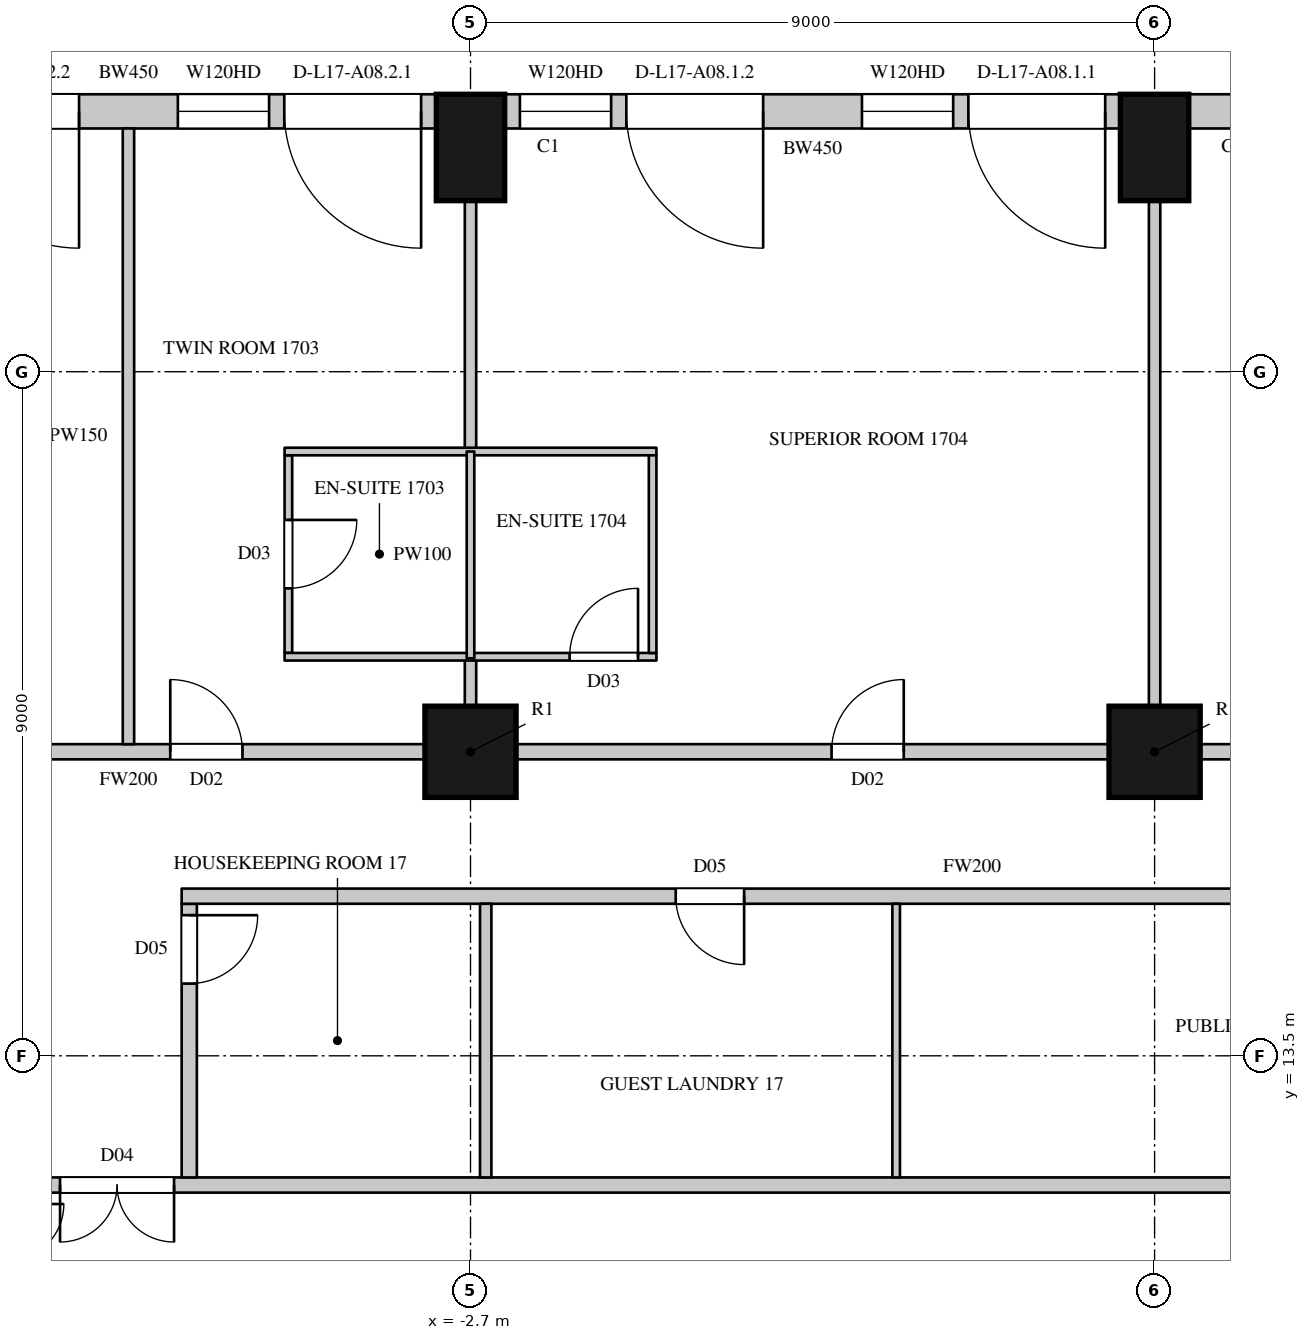
"""IFC4 building model, lengths in metres.
Left out: names, types, materials, properties, quantities, classifications, styles, units other than length and angle.
Written with IfcOpenShell. Run it as: python <this file> out.ifc"""

import sys

from ifc_helpers import new_model, si_unit, direction, frame, frame_2d, origin, origin_2d, place, context, subcontext, project, spatial, rectangle, circle, extrude, element, fill, save


model = new_model("IFC4")
c1 = context("Model", 3, precision=1e-05, world=origin(), true_north=direction((0.0, 1.0)))
c2 = subcontext(c1, "Body", "Model", "MODEL_VIEW")
j1 = project(units=[si_unit("LENGTHUNIT", "METRE"), si_unit("PLANEANGLEUNIT", "RADIAN")], contexts=[c1])
p1 = place(None, origin())
s1 = spatial("IfcSite", under=j1, at=p1, CompositionType="ELEMENT")
p2 = place(p1, origin())
s2 = spatial("IfcBuilding", under=s1, at=p2, CompositionType="ELEMENT")
p3 = place(p2, frame((0.0, 0.0, 91.5)))
s3 = spatial("IfcBuildingStorey", under=s2, at=p3, CompositionType="ELEMENT", Elevation=91.5)
for number, where, z_axis, x_axis in (
    (1, (6.3, 25.45, 0.0), (0.0, 0.0, 1.0), (-1.0, 0.0, 0.0)),
    (2, (-2.7, 25.45, 0.0), (0.0, 0.0, 1.0), (-1.0, 0.0, 0.0)),
):
    element("IfcColumn", number, at=place(p3, frame(where, z_axis=z_axis, x_axis=x_axis)), inside=s3, PredefinedType="COLUMN", context=c2, shape_type="SweptSolid", body=[
        extrude(rectangle(XDim=0.9, YDim=1.4, at=origin_2d()), origin(), (0.0, 0.0, 1.0), 3.6),
    ])
for number, where, z_axis, x_axis in (
    (3, (-2.7, 17.5, 0.0), (0.0, 0.0, 1.0), (1.0, 0.0, 0.0)),
    (4, (6.3, 17.5, 0.0), (0.0, 0.0, 1.0), (1.0, 0.0, 0.0)),
):
    element("IfcColumn", number, at=place(p3, frame(where, z_axis=z_axis, x_axis=x_axis)), inside=s3, PredefinedType="COLUMN", context=c2, shape_type="SweptSolid", body=[
        extrude(circle(Radius=0.6, at=origin_2d()), origin(), (0.0, 0.0, 1.0), 3.6),
    ])
p4 = place(p3, frame((11.989, 25.925, 0.0), z_axis=(0.0, 0.0, 1.0), x_axis=(-1.0, 0.0, 0.0)))
e5 = element("IfcWall", 5, at=p4, inside=s3, PredefinedType="SOLIDWALL", context=c2, shape_type="SweptSolid", body=[
    extrude(rectangle(XDim=5.239, YDim=0.45, at=frame_2d((2.619, 0.0))), origin(), (0.0, 0.0, 1.0), 3.3),
])
p5 = place(p4, frame((1.77, 0.0, 1.05)))
e6 = element("IfcOpeningElement", 6, at=p5, cuts=e5, PredefinedType="OPENING", context=c2, shape_type="SweptSolid", body=[
    extrude(rectangle(XDim=2.1, YDim=2.0, at=frame_2d((1.05, 1.0))), frame((0.0, 0.235, 0.0), z_axis=(0.0, -1.0, 0.0), x_axis=(1.0, 0.0, 0.0)), (0.0, 0.0, 1.0), 0.47),
])
p6 = place(p3, frame((5.85, 25.925, 0.0), z_axis=(0.0, 0.0, 1.0), x_axis=(-1.0, 0.0, 0.0)))
e7 = element("IfcWall", 7, at=p6, inside=s3, PredefinedType="SOLIDWALL", context=c2, shape_type="SweptSolid", body=[
    extrude(rectangle(XDim=8.1, YDim=0.45, at=frame_2d((4.05, 0.0))), origin(), (0.0, 0.0, 1.0), 3.3),
])
p7 = place(p6, frame((0.2, 0.0, 0.0)))
e8 = element("IfcOpeningElement", 8, at=p7, cuts=e7, PredefinedType="OPENING", context=c2, shape_type="SweptSolid", body=[
    extrude(rectangle(XDim=1.8, YDim=2.4, at=frame_2d((0.9, 1.2))), frame((0.0, 0.235, 0.0), z_axis=(0.0, -1.0, 0.0), x_axis=(1.0, 0.0, 0.0)), (0.0, 0.0, 1.0), 0.47),
])
p8 = place(p6, frame((2.2, 0.0, 1.05)))
e9 = element("IfcOpeningElement", 9, at=p8, cuts=e7, PredefinedType="OPENING", context=c2, shape_type="SweptSolid", body=[
    extrude(rectangle(XDim=1.2, YDim=2.0, at=frame_2d((0.6, 1.0))), frame((0.0, 0.235, 0.0), z_axis=(0.0, -1.0, 0.0), x_axis=(1.0, 0.0, 0.0)), (0.0, 0.0, 1.0), 0.47),
])
p9 = place(p6, frame((4.7, 0.0, 0.0)))
e10 = element("IfcOpeningElement", 10, at=p9, cuts=e7, PredefinedType="OPENING", context=c2, shape_type="SweptSolid", body=[
    extrude(rectangle(XDim=1.8, YDim=2.4, at=frame_2d((0.9, 1.2))), frame((0.0, 0.235, 0.0), z_axis=(0.0, -1.0, 0.0), x_axis=(1.0, 0.0, 0.0)), (0.0, 0.0, 1.0), 0.47),
])
p10 = place(p6, frame((6.7, 0.0, 1.05)))
e11 = element("IfcOpeningElement", 11, at=p10, cuts=e7, PredefinedType="OPENING", context=c2, shape_type="SweptSolid", body=[
    extrude(rectangle(XDim=1.2, YDim=2.0, at=frame_2d((0.6, 1.0))), frame((0.0, 0.235, 0.0), z_axis=(0.0, -1.0, 0.0), x_axis=(1.0, 0.0, 0.0)), (0.0, 0.0, 1.0), 0.47),
])
p11 = place(p3, frame((-3.15, 25.925, 0.0), z_axis=(0.0, 0.0, 1.0), x_axis=(-1.0, 0.0, 0.0)))
e12 = element("IfcWall", 12, at=p11, inside=s3, PredefinedType="SOLIDWALL", context=c2, shape_type="SweptSolid", body=[
    extrude(rectangle(XDim=8.1, YDim=0.45, at=frame_2d((4.05, 0.0))), origin(), (0.0, 0.0, 1.0), 3.3),
])
p12 = place(p11, frame((0.2, 0.0, 0.0)))
e13 = element("IfcOpeningElement", 13, at=p12, cuts=e12, PredefinedType="OPENING", context=c2, shape_type="SweptSolid", body=[
    extrude(rectangle(XDim=1.8, YDim=2.4, at=frame_2d((0.9, 1.2))), frame((0.0, 0.235, 0.0), z_axis=(0.0, -1.0, 0.0), x_axis=(1.0, 0.0, 0.0)), (0.0, 0.0, 1.0), 0.47),
])
p13 = place(p11, frame((2.2, 0.0, 1.05)))
e14 = element("IfcOpeningElement", 14, at=p13, cuts=e12, PredefinedType="OPENING", context=c2, shape_type="SweptSolid", body=[
    extrude(rectangle(XDim=1.2, YDim=2.0, at=frame_2d((0.6, 1.0))), frame((0.0, 0.235, 0.0), z_axis=(0.0, -1.0, 0.0), x_axis=(1.0, 0.0, 0.0)), (0.0, 0.0, 1.0), 0.47),
])
p14 = place(p11, frame((4.7, 0.0, 0.0)))
e15 = element("IfcOpeningElement", 15, at=p14, cuts=e12, PredefinedType="OPENING", context=c2, shape_type="SweptSolid", body=[
    extrude(rectangle(XDim=1.8, YDim=2.4, at=frame_2d((0.9, 1.2))), frame((0.0, 0.235, 0.0), z_axis=(0.0, -1.0, 0.0), x_axis=(1.0, 0.0, 0.0)), (0.0, 0.0, 1.0), 0.47),
])
p15 = place(p11, frame((6.7, 0.0, 1.05)))
e16 = element("IfcOpeningElement", 16, at=p15, cuts=e12, PredefinedType="OPENING", context=c2, shape_type="SweptSolid", body=[
    extrude(rectangle(XDim=1.2, YDim=2.0, at=frame_2d((0.6, 1.0))), frame((0.0, 0.235, 0.0), z_axis=(0.0, -1.0, 0.0), x_axis=(1.0, 0.0, 0.0)), (0.0, 0.0, 1.0), 0.47),
])
p16 = place(p3, frame((-11.1, 17.5, 0.0), z_axis=(0.0, 0.0, 1.0), x_axis=(1.0, 0.0, 0.0)))
e17 = element("IfcWall", 17, at=p16, inside=s3, PredefinedType="PARTITIONING", context=c2, shape_type="SweptSolid", body=[
    extrude(rectangle(XDim=7.8, YDim=0.2, at=frame_2d((3.9, 0.0))), origin(), (0.0, 0.0, 1.0), 2.75),
])
p17 = place(p16, frame((4.45, 0.0, 0.0)))
e18 = element("IfcOpeningElement", 18, at=p17, cuts=e17, PredefinedType="OPENING", context=c2, shape_type="SweptSolid", body=[
    extrude(rectangle(XDim=0.95, YDim=2.2, at=frame_2d((0.475, 1.1))), frame((0.0, 0.11, 0.0), z_axis=(0.0, -1.0, 0.0), x_axis=(1.0, 0.0, 0.0)), (0.0, 0.0, 1.0), 0.22),
])
p18 = place(p3, frame((-2.1, 17.5, 0.0), z_axis=(0.0, 0.0, 1.0), x_axis=(1.0, 0.0, 0.0)))
e19 = element("IfcWall", 19, at=p18, inside=s3, PredefinedType="PARTITIONING", context=c2, shape_type="SweptSolid", body=[
    extrude(rectangle(XDim=7.8, YDim=0.2, at=frame_2d((3.9, 0.0))), origin(), (0.0, 0.0, 1.0), 2.75),
])
p19 = place(p18, frame((4.15, 0.0, 0.0)))
e20 = element("IfcOpeningElement", 20, at=p19, cuts=e19, PredefinedType="OPENING", context=c2, shape_type="SweptSolid", body=[
    extrude(rectangle(XDim=0.95, YDim=2.2, at=frame_2d((0.475, 1.1))), frame((0.0, 0.11, 0.0), z_axis=(0.0, -1.0, 0.0), x_axis=(1.0, 0.0, 0.0)), (0.0, 0.0, 1.0), 0.22),
])
p20 = place(p3, frame((6.9, 17.5, 0.0), z_axis=(0.0, 0.0, 1.0), x_axis=(1.0, 0.0, 0.0)))
e21 = element("IfcWall", 21, at=p20, inside=s3, PredefinedType="PARTITIONING", context=c2, shape_type="SweptSolid", body=[
    extrude(rectangle(XDim=7.8, YDim=0.2, at=frame_2d((3.9, 0.0))), origin(), (0.0, 0.0, 1.0), 2.75),
])
p21 = place(p20, frame((1.45, 0.0, 0.0)))
e22 = element("IfcOpeningElement", 22, at=p21, cuts=e21, PredefinedType="OPENING", context=c2, shape_type="SweptSolid", body=[
    extrude(rectangle(XDim=1.1, YDim=2.4, at=frame_2d((0.55, 1.2))), frame((0.0, 0.11, 0.0), z_axis=(0.0, -1.0, 0.0), x_axis=(1.0, 0.0, 0.0)), (0.0, 0.0, 1.0), 0.22),
])
p22 = place(p3, frame((-8.9, 11.8, 0.0), z_axis=(0.0, 0.0, 1.0), x_axis=(1.0, 0.0, 0.0)))
e23 = element("IfcWall", 23, at=p22, inside=s3, PredefinedType="PARTITIONING", context=c2, shape_type="SweptSolid", body=[
    extrude(rectangle(XDim=19.7, YDim=0.2, at=frame_2d((9.85, 0.0))), origin(), (0.0, 0.0, 1.0), 3.3),
])
p23 = place(p22, frame((0.8, 0.0, 0.0)))
e24 = element("IfcOpeningElement", 24, at=p23, cuts=e23, PredefinedType="OPENING", context=c2, shape_type="SweptSolid", body=[
    extrude(rectangle(XDim=1.5, YDim=2.2, at=frame_2d((0.75, 1.1))), frame((0.0, 0.11, 0.0), z_axis=(0.0, -1.0, 0.0), x_axis=(1.0, 0.0, 0.0)), (0.0, 0.0, 1.0), 0.22),
])
p24 = place(p3, frame((-6.4, 11.9, 0.0), z_axis=(0.0, 0.0, 1.0), x_axis=(0.0, 1.0, 0.0)))
e25 = element("IfcWall", 25, at=p24, inside=s3, PredefinedType="PARTITIONING", context=c2, shape_type="SweptSolid", body=[
    extrude(rectangle(XDim=3.6, YDim=0.2, at=frame_2d((1.8, 0.0))), origin(), (0.0, 0.0, 1.0), 3.3),
])
p25 = place(p24, frame((2.55, 0.0, 0.0)))
e26 = element("IfcOpeningElement", 26, at=p25, cuts=e25, PredefinedType="OPENING", context=c2, shape_type="SweptSolid", body=[
    extrude(rectangle(XDim=0.9, YDim=2.2, at=frame_2d((0.45, 1.1))), frame((0.0, 0.11, 0.0), z_axis=(0.0, -1.0, 0.0), x_axis=(1.0, 0.0, 0.0)), (0.0, 0.0, 1.0), 0.22),
])
p26 = place(p3, frame((-6.5, 15.6, 0.0), z_axis=(0.0, 0.0, 1.0), x_axis=(1.0, 0.0, 0.0)))
e27 = element("IfcWall", 27, at=p26, inside=s3, PredefinedType="PARTITIONING", context=c2, shape_type="SweptSolid", body=[
    extrude(rectangle(XDim=20.8, YDim=0.2, at=frame_2d((10.4, 0.0))), origin(), (0.0, 0.0, 1.0), 3.3),
])
p27 = place(p26, frame((6.5, 0.0, 0.0)))
e28 = element("IfcOpeningElement", 28, at=p27, cuts=e27, PredefinedType="OPENING", context=c2, shape_type="SweptSolid", body=[
    extrude(rectangle(XDim=0.9, YDim=2.2, at=frame_2d((0.45, 1.1))), frame((0.0, 0.11, 0.0), z_axis=(0.0, -1.0, 0.0), x_axis=(1.0, 0.0, 0.0)), (0.0, 0.0, 1.0), 0.22),
])
p28 = place(p26, frame((16.65, 0.0, 0.0)))
e29 = element("IfcOpeningElement", 29, at=p28, cuts=e27, PredefinedType="OPENING", context=c2, shape_type="SweptSolid", body=[
    extrude(rectangle(XDim=0.9, YDim=2.2, at=frame_2d((0.45, 1.1))), frame((0.0, 0.11, 0.0), z_axis=(0.0, -1.0, 0.0), x_axis=(1.0, 0.0, 0.0)), (0.0, 0.0, 1.0), 0.22),
])
p29 = place(p3, frame((-7.2, 17.6, 0.0), z_axis=(0.0, 0.0, 1.0), x_axis=(0.0, 1.0, 0.0)))
e30 = element("IfcWall", 30, at=p29, inside=s3, PredefinedType="PARTITIONING", context=c2, shape_type="SweptSolid", body=[
    extrude(rectangle(XDim=8.1, YDim=0.15, at=frame_2d((4.05, 0.0))), origin(), (0.0, 0.0, 1.0), 2.65),
])
p30 = place(p3, frame((-2.7, 18.1, 0.0), z_axis=(0.0, 0.0, 1.0), x_axis=(0.0, 1.0, 0.0)))
e31 = element("IfcWall", 31, at=p30, inside=s3, PredefinedType="PARTITIONING", context=c2, shape_type="SweptSolid", body=[
    extrude(rectangle(XDim=0.63, YDim=0.15, at=frame_2d((0.315, 0.0))), origin(), (0.0, 0.0, 1.0), 2.75),
])
p31 = place(p3, frame((-2.7, 21.45, 0.0), z_axis=(0.0, 0.0, 1.0), x_axis=(0.0, 1.0, 0.0)))
e32 = element("IfcWall", 32, at=p31, inside=s3, PredefinedType="PARTITIONING", context=c2, shape_type="SweptSolid", body=[
    extrude(rectangle(XDim=3.3, YDim=0.15, at=frame_2d((1.65, 0.0))), origin(), (0.0, 0.0, 1.0), 2.75),
])
p32 = place(p3, frame((-2.5, 11.9, 0.0), z_axis=(0.0, 0.0, 1.0), x_axis=(0.0, 1.0, 0.0)))
e33 = element("IfcWall", 33, at=p32, inside=s3, PredefinedType="PARTITIONING", context=c2, shape_type="SweptSolid", body=[
    extrude(rectangle(XDim=3.6, YDim=0.15, at=frame_2d((1.8, 0.0))), origin(), (0.0, 0.0, 1.0), 2.75),
])
p33 = place(p3, frame((6.3, 18.1, 0.0), z_axis=(0.0, 0.0, 1.0), x_axis=(0.0, 1.0, 0.0)))
e34 = element("IfcWall", 34, at=p33, inside=s3, PredefinedType="PARTITIONING", context=c2, shape_type="SweptSolid", body=[
    extrude(rectangle(XDim=6.65, YDim=0.15, at=frame_2d((3.325, 0.0))), origin(), (0.0, 0.0, 1.0), 2.75),
])
p34 = place(p3, frame((-5.096, 18.8, 0.0), z_axis=(0.0, 0.0, 1.0), x_axis=(0.0, 1.0, 0.0)))
e35 = element("IfcWall", 35, at=p34, inside=s3, PredefinedType="PARTITIONING", context=c2, shape_type="SweptSolid", body=[
    extrude(rectangle(XDim=2.6, YDim=0.1, at=frame_2d((1.3, 0.0))), origin(), (0.0, 0.0, 1.0), 3.3),
])
p35 = place(p34, frame((0.85, 0.0, 0.0)))
e36 = element("IfcOpeningElement", 36, at=p35, cuts=e35, PredefinedType="OPENING", context=c2, shape_type="SweptSolid", body=[
    extrude(rectangle(XDim=0.9, YDim=2.2, at=frame_2d((0.45, 1.1))), frame((0.0, 0.06, 0.0), z_axis=(0.0, -1.0, 0.0), x_axis=(1.0, 0.0, 0.0)), (0.0, 0.0, 1.0), 0.12),
])
p36 = place(p3, frame((-5.146, 18.75, 0.0), z_axis=(0.0, 0.0, 1.0), x_axis=(1.0, 0.0, 0.0)))
e37 = element("IfcWall", 37, at=p36, inside=s3, PredefinedType="PARTITIONING", context=c2, shape_type="SweptSolid", body=[
    extrude(rectangle(XDim=4.892, YDim=0.1, at=frame_2d((2.446, 0.0))), origin(), (0.0, 0.0, 1.0), 3.3),
])
p37 = place(p36, frame((3.75, 0.0, 0.0)))
e38 = element("IfcOpeningElement", 38, at=p37, cuts=e37, PredefinedType="OPENING", context=c2, shape_type="SweptSolid", body=[
    extrude(rectangle(XDim=0.9, YDim=2.2, at=frame_2d((0.45, 1.1))), frame((0.0, 0.06, 0.0), z_axis=(0.0, -1.0, 0.0), x_axis=(1.0, 0.0, 0.0)), (0.0, 0.0, 1.0), 0.12),
])
p38 = place(p3, frame((-5.146, 21.45, 0.0), z_axis=(0.0, 0.0, 1.0), x_axis=(1.0, 0.0, 0.0)))
e39 = element("IfcWall", 39, at=p38, inside=s3, PredefinedType="PARTITIONING", context=c2, shape_type="SweptSolid", body=[
    extrude(rectangle(XDim=4.892, YDim=0.1, at=frame_2d((2.446, 0.0))), origin(), (0.0, 0.0, 1.0), 3.3),
])
p39 = place(p3, frame((-2.7, 18.73, 0.0), z_axis=(0.0, 0.0, 1.0), x_axis=(0.0, 1.0, 0.0)))
e40 = element("IfcWall", 40, at=p39, inside=s3, PredefinedType="PARTITIONING", context=c2, shape_type="SweptSolid", body=[
    extrude(rectangle(XDim=2.72, YDim=0.1, at=frame_2d((1.36, 0.0))), origin(), (0.0, 0.0, 1.0), 2.75),
])
p40 = place(p3, frame((-0.304, 18.8, 0.0), z_axis=(0.0, 0.0, 1.0), x_axis=(0.0, 1.0, 0.0)))
e41 = element("IfcWall", 41, at=p40, inside=s3, PredefinedType="PARTITIONING", context=c2, shape_type="SweptSolid", body=[
    extrude(rectangle(XDim=2.6, YDim=0.1, at=frame_2d((1.3, 0.0))), origin(), (0.0, 0.0, 1.0), 3.3),
])
p41 = place(p3, frame((2.9, 11.9, 0.0), z_axis=(0.0, 0.0, 1.0), x_axis=(0.0, 1.0, 0.0)))
e42 = element("IfcWall", 42, at=p41, inside=s3, PredefinedType="PARTITIONING", context=c2, shape_type="SweptSolid", body=[
    extrude(rectangle(XDim=3.6, YDim=0.1, at=frame_2d((1.8, 0.0))), origin(), (0.0, 0.0, 1.0), 3.3),
])
p42 = place(p7, origin())
e43 = element("IfcDoor", 43, at=p42, inside=s3, OperationType="SLIDING_TO_LEFT", PredefinedType="DOOR", context=c2, shape_type="SweptSolid", body=[
    extrude(rectangle(XDim=1.8, YDim=2.4, at=frame_2d((0.9, 1.2))), frame((0.0, 0.13, 0.0), z_axis=(0.0, -1.0, 0.0), x_axis=(1.0, 0.0, 0.0)), (0.0, 0.0, 1.0), 0.05),
])
fill(e8, e43)
p43 = place(p8, origin())
e44 = element("IfcWindow", 44, at=p43, inside=s3, PartitioningType="SINGLE_PANEL", PredefinedType="WINDOW", context=c2, shape_type="SweptSolid", body=[
    extrude(rectangle(XDim=1.2, YDim=2.0, at=frame_2d((0.6, 1.0))), frame((0.0, 0.135, 0.0), z_axis=(0.0, -1.0, 0.0), x_axis=(1.0, 0.0, 0.0)), (0.0, 0.0, 1.0), 0.06),
])
fill(e9, e44)
p44 = place(p9, origin())
e45 = element("IfcDoor", 45, at=p44, inside=s3, OperationType="SLIDING_TO_LEFT", PredefinedType="DOOR", context=c2, shape_type="SweptSolid", body=[
    extrude(rectangle(XDim=1.8, YDim=2.4, at=frame_2d((0.9, 1.2))), frame((0.0, 0.13, 0.0), z_axis=(0.0, -1.0, 0.0), x_axis=(1.0, 0.0, 0.0)), (0.0, 0.0, 1.0), 0.05),
])
fill(e10, e45)
p45 = place(p10, origin())
e46 = element("IfcWindow", 46, at=p45, inside=s3, PartitioningType="SINGLE_PANEL", PredefinedType="WINDOW", context=c2, shape_type="SweptSolid", body=[
    extrude(rectangle(XDim=1.2, YDim=2.0, at=frame_2d((0.6, 1.0))), frame((0.0, 0.135, 0.0), z_axis=(0.0, -1.0, 0.0), x_axis=(1.0, 0.0, 0.0)), (0.0, 0.0, 1.0), 0.06),
])
fill(e11, e46)
p46 = place(p12, origin())
e47 = element("IfcDoor", 47, at=p46, inside=s3, OperationType="SLIDING_TO_LEFT", PredefinedType="DOOR", context=c2, shape_type="SweptSolid", body=[
    extrude(rectangle(XDim=1.8, YDim=2.4, at=frame_2d((0.9, 1.2))), frame((0.0, 0.13, 0.0), z_axis=(0.0, -1.0, 0.0), x_axis=(1.0, 0.0, 0.0)), (0.0, 0.0, 1.0), 0.05),
])
fill(e13, e47)
p47 = place(p13, origin())
e48 = element("IfcWindow", 48, at=p47, inside=s3, PartitioningType="SINGLE_PANEL", PredefinedType="WINDOW", context=c2, shape_type="SweptSolid", body=[
    extrude(rectangle(XDim=1.2, YDim=2.0, at=frame_2d((0.6, 1.0))), frame((0.0, 0.135, 0.0), z_axis=(0.0, -1.0, 0.0), x_axis=(1.0, 0.0, 0.0)), (0.0, 0.0, 1.0), 0.06),
])
fill(e14, e48)
p48 = place(p14, origin())
e49 = element("IfcDoor", 49, at=p48, inside=s3, OperationType="SLIDING_TO_LEFT", PredefinedType="DOOR", context=c2, shape_type="SweptSolid", body=[
    extrude(rectangle(XDim=1.8, YDim=2.4, at=frame_2d((0.9, 1.2))), frame((0.0, 0.13, 0.0), z_axis=(0.0, -1.0, 0.0), x_axis=(1.0, 0.0, 0.0)), (0.0, 0.0, 1.0), 0.05),
])
fill(e15, e49)
p49 = place(p23, origin())
e50 = element("IfcDoor", 50, at=p49, inside=s3, OperationType="DOUBLE_DOOR_SINGLE_SWING", PredefinedType="DOOR", context=c2, shape_type="SweptSolid", body=[
    extrude(rectangle(XDim=1.5, YDim=2.2, at=frame_2d((0.75, 1.1))), frame((0.0, 0.025, 0.0), z_axis=(0.0, -1.0, 0.0), x_axis=(1.0, 0.0, 0.0)), (0.0, 0.0, 1.0), 0.05),
])
fill(e24, e50)
p50 = place(p25, origin())
e51 = element("IfcDoor", 51, at=p50, inside=s3, OperationType="SINGLE_SWING_LEFT", PredefinedType="DOOR", context=c2, shape_type="SweptSolid", body=[
    extrude(rectangle(XDim=0.9, YDim=2.2, at=frame_2d((0.45, 1.1))), frame((0.0, 0.025, 0.0), z_axis=(0.0, -1.0, 0.0), x_axis=(1.0, 0.0, 0.0)), (0.0, 0.0, 1.0), 0.05),
])
fill(e26, e51)
p51 = place(p27, origin())
e52 = element("IfcDoor", 52, at=p51, inside=s3, OperationType="SINGLE_SWING_LEFT", PredefinedType="DOOR", context=c2, shape_type="SweptSolid", body=[
    extrude(rectangle(XDim=0.9, YDim=2.2, at=frame_2d((0.45, 1.1))), frame((0.0, 0.025, 0.0), z_axis=(0.0, -1.0, 0.0), x_axis=(1.0, 0.0, 0.0)), (0.0, 0.0, 1.0), 0.05),
])
fill(e28, e52)
p52 = place(p17, origin())
e53 = element("IfcDoor", 53, at=p52, inside=s3, OperationType="SINGLE_SWING_LEFT", PredefinedType="DOOR", context=c2, shape_type="SweptSolid", body=[
    extrude(rectangle(XDim=0.95, YDim=2.2, at=frame_2d((0.475, 1.1))), frame((0.0, 0.025, 0.0), z_axis=(0.0, -1.0, 0.0), x_axis=(1.0, 0.0, 0.0)), (0.0, 0.0, 1.0), 0.05),
])
fill(e18, e53)
p53 = place(p35, origin())
e54 = element("IfcDoor", 54, at=p53, inside=s3, OperationType="SINGLE_SWING_LEFT", PredefinedType="DOOR", context=c2, shape_type="SweptSolid", body=[
    extrude(rectangle(XDim=0.9, YDim=2.2, at=frame_2d((0.45, 1.1))), frame((0.0, 0.025, 0.0), z_axis=(0.0, -1.0, 0.0), x_axis=(1.0, 0.0, 0.0)), (0.0, 0.0, 1.0), 0.05),
])
fill(e36, e54)
p54 = place(p19, origin())
e55 = element("IfcDoor", 55, at=p54, inside=s3, OperationType="SINGLE_SWING_RIGHT", PredefinedType="DOOR", context=c2, shape_type="SweptSolid", body=[
    extrude(rectangle(XDim=0.95, YDim=2.2, at=frame_2d((0.475, 1.1))), frame((0.0, 0.025, 0.0), z_axis=(0.0, -1.0, 0.0), x_axis=(1.0, 0.0, 0.0)), (0.0, 0.0, 1.0), 0.05),
])
fill(e20, e55)
p55 = place(p37, origin())
e56 = element("IfcDoor", 56, at=p55, inside=s3, OperationType="SINGLE_SWING_RIGHT", PredefinedType="DOOR", context=c2, shape_type="SweptSolid", body=[
    extrude(rectangle(XDim=0.9, YDim=2.2, at=frame_2d((0.45, 1.1))), frame((0.0, 0.025, 0.0), z_axis=(0.0, -1.0, 0.0), x_axis=(1.0, 0.0, 0.0)), (0.0, 0.0, 1.0), 0.05),
])
fill(e38, e56)
save(model, sys.argv[1])
